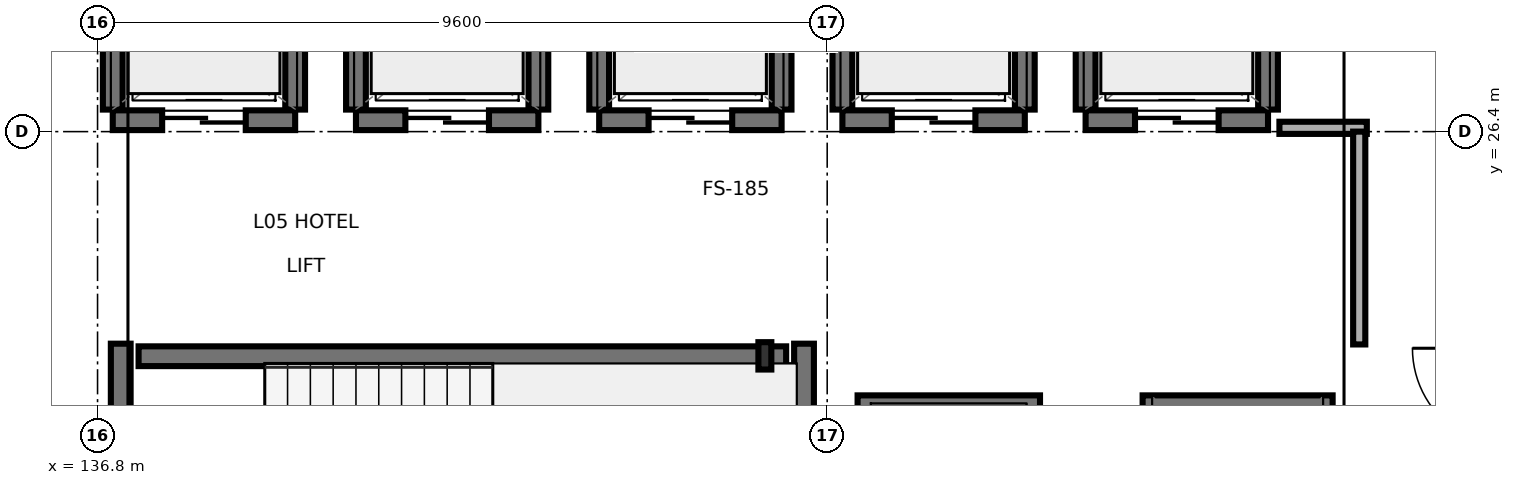
"""IFC4 building model, lengths in metres.
Left out: names, types, materials, properties, quantities, classifications, styles, units other than length and angle.
Written with IfcOpenShell. Run it as: python <this file> out.ifc"""

import sys

from ifc_helpers import new_model, si_unit, direction, frame, frame_2d, origin, origin_2d, place, context, subcontext, project, spatial, rectangle, i_section, extrude, element, fill, save


model = new_model("IFC4")
c1 = context("Model", 3, precision=1e-05, world=origin(), true_north=direction((0.0, 1.0)))
c2 = subcontext(c1, "Body", "Model", "MODEL_VIEW")
j1 = project(units=[si_unit("LENGTHUNIT", "METRE"), si_unit("PLANEANGLEUNIT", "RADIAN")], contexts=[c1])
p1 = place(None, origin())
s1 = spatial("IfcSite", under=j1, at=p1, CompositionType="ELEMENT")
p2 = place(p1, origin())
s2 = spatial("IfcBuilding", under=s1, at=p2, CompositionType="ELEMENT")
p3 = place(p2, frame((0.0, 0.0, 18.1)))
s3 = spatial("IfcBuildingStorey", under=s2, at=p3, CompositionType="ELEMENT", Elevation=18.1)
p4 = place(p3, frame((145.58, 23.45, 0.0), z_axis=(0.0, 0.0, 1.0), x_axis=(1.0, 0.0, 0.0)))
e1 = element("IfcColumn", 1, at=p4, inside=s3, PredefinedType="PILASTER", context=c2, shape_type="SweptSolid", body=[
    extrude(i_section(OverallWidth=0.17, OverallDepth=0.36, WebThickness=0.008, FlangeThickness=0.013, FilletRadius=0.018, at=origin_2d()), origin(), (0.0, 0.0, 1.0), 3.4),
])
p5 = place(p3, frame((137.105, 19.34, 0.0), z_axis=(0.0, 0.0, 1.0), x_axis=(0.0, 1.0, 0.0)))
e2 = element("IfcWall", 2, at=p5, inside=s3, PredefinedType="SHEAR", context=c2, shape_type="SweptSolid", body=[
    extrude(rectangle(XDim=4.27, YDim=0.26, at=frame_2d((2.135, 0.0))), origin(), (0.0, 0.0, 1.0), 3.21),
])
p6 = place(p5, frame((0.61, 0.0, 0.0)))
e3 = element("IfcOpeningElement", 3, at=p6, cuts=e2, PredefinedType="OPENING", context=c2, shape_type="SweptSolid", body=[
    extrude(rectangle(XDim=1.1, YDim=2.2, at=frame_2d((0.55, 1.1))), frame((0.0, 0.14, 0.0), z_axis=(0.0, -1.0, 0.0), x_axis=(1.0, 0.0, 0.0)), (0.0, 0.0, 1.0), 0.28),
])
p7 = place(p3, frame((146.095, 19.34, 0.0), z_axis=(0.0, 0.0, 1.0), x_axis=(0.0, 1.0, 0.0)))
e4 = element("IfcWall", 4, at=p7, inside=s3, PredefinedType="SHEAR", context=c2, shape_type="SweptSolid", body=[
    extrude(rectangle(XDim=4.27, YDim=0.26, at=frame_2d((2.135, 0.0))), origin(), (0.0, 0.0, 1.0), 3.21),
])
p8 = place(p3, frame((137.34, 23.445, 0.0), z_axis=(0.0, 0.0, 1.0), x_axis=(1.0, 0.0, 0.0)))
e5 = element("IfcWall", 5, at=p8, inside=s3, PredefinedType="SHEAR", context=c2, shape_type="SweptSolid", body=[
    extrude(rectangle(XDim=8.52, YDim=0.26, at=frame_2d((4.26, 0.0))), origin(), (0.0, 0.0, 1.0), 3.21),
])
p9 = place(p3, frame((137.0, 26.55, 0.0), z_axis=(0.0, 0.0, 1.0), x_axis=(1.0, 0.0, 0.0)))
e6 = element("IfcWall", 6, at=p9, inside=s3, PredefinedType="SHEAR", context=c2, shape_type="SweptSolid", body=[
    extrude(rectangle(XDim=2.4, YDim=0.26, at=frame_2d((1.2, 0.0))), origin(), (0.0, 0.0, 1.0), 2.745),
])
p10 = place(p9, frame((0.65, 0.0, 0.0)))
e7 = element("IfcOpeningElement", 7, at=p10, cuts=e6, PredefinedType="OPENING", context=c2, shape_type="SweptSolid", body=[
    extrude(rectangle(XDim=1.1, YDim=2.2, at=frame_2d((0.55, 1.1))), frame((0.0, 0.14, 0.0), z_axis=(0.0, -1.0, 0.0), x_axis=(1.0, 0.0, 0.0)), (0.0, 0.0, 1.0), 0.28),
])
for number, where, z_axis, x_axis in (
    (8, (137.0, 26.69, 0.0), (0.0, 0.0, 1.0), (0.0, 1.0, 0.0)),
    (9, (139.4, 26.69, 0.0), (0.0, 0.0, 1.0), (0.0, 1.0, 0.0)),
):
    element("IfcWall", number, at=place(p3, frame(where, z_axis=z_axis, x_axis=x_axis)), inside=s3, PredefinedType="SHEAR", context=c2, shape_type="SweptSolid", body=[
        extrude(rectangle(XDim=1.82, YDim=0.26, at=frame_2d((0.91, 0.0))), origin(), (0.0, 0.0, 1.0), 2.745),
    ])
p11 = place(p3, frame((140.2, 26.55, 0.0), z_axis=(0.0, 0.0, 1.0), x_axis=(1.0, 0.0, 0.0)))
e10 = element("IfcWall", 10, at=p11, inside=s3, PredefinedType="SHEAR", context=c2, shape_type="SweptSolid", body=[
    extrude(rectangle(XDim=2.4, YDim=0.26, at=frame_2d((1.2, 0.0))), origin(), (0.0, 0.0, 1.0), 3.21),
])
p12 = place(p11, frame((0.65, 0.0, 0.0)))
e11 = element("IfcOpeningElement", 11, at=p12, cuts=e10, PredefinedType="OPENING", context=c2, shape_type="SweptSolid", body=[
    extrude(rectangle(XDim=1.1, YDim=2.2, at=frame_2d((0.55, 1.1))), frame((0.0, 0.14, 0.0), z_axis=(0.0, -1.0, 0.0), x_axis=(1.0, 0.0, 0.0)), (0.0, 0.0, 1.0), 0.28),
])
for number, where, z_axis, x_axis in (
    (12, (140.2, 26.69, 0.0), (0.0, 0.0, 1.0), (0.0, 1.0, 0.0)),
    (13, (142.6, 26.69, 0.0), (0.0, 0.0, 1.0), (0.0, 1.0, 0.0)),
):
    element("IfcWall", number, at=place(p3, frame(where, z_axis=z_axis, x_axis=x_axis)), inside=s3, PredefinedType="SHEAR", context=c2, shape_type="SweptSolid", body=[
        extrude(rectangle(XDim=1.82, YDim=0.26, at=frame_2d((0.91, 0.0))), origin(), (0.0, 0.0, 1.0), 3.21),
    ])
p13 = place(p3, frame((143.4, 26.55, 0.0), z_axis=(0.0, 0.0, 1.0), x_axis=(1.0, 0.0, 0.0)))
e14 = element("IfcWall", 14, at=p13, inside=s3, PredefinedType="SHEAR", context=c2, shape_type="SweptSolid", body=[
    extrude(rectangle(XDim=2.4, YDim=0.26, at=frame_2d((1.2, 0.0))), origin(), (0.0, 0.0, 1.0), 3.21),
])
p14 = place(p13, frame((0.65, 0.0, 0.0)))
e15 = element("IfcOpeningElement", 15, at=p14, cuts=e14, PredefinedType="OPENING", context=c2, shape_type="SweptSolid", body=[
    extrude(rectangle(XDim=1.1, YDim=2.2, at=frame_2d((0.55, 1.1))), frame((0.0, 0.14, 0.0), z_axis=(0.0, -1.0, 0.0), x_axis=(1.0, 0.0, 0.0)), (0.0, 0.0, 1.0), 0.28),
])
for number, where, z_axis, x_axis in (
    (16, (143.4, 26.69, 0.0), (0.0, 0.0, 1.0), (0.0, 1.0, 0.0)),
    (17, (145.8, 26.69, 0.0), (0.0, 0.0, 1.0), (0.0, 1.0, 0.0)),
):
    element("IfcWall", number, at=place(p3, frame(where, z_axis=z_axis, x_axis=x_axis)), inside=s3, PredefinedType="SHEAR", context=c2, shape_type="SweptSolid", body=[
        extrude(rectangle(XDim=1.82, YDim=0.26, at=frame_2d((0.91, 0.0))), origin(), (0.0, 0.0, 1.0), 3.21),
    ])
p15 = place(p3, frame((146.6, 26.55, 0.0), z_axis=(0.0, 0.0, 1.0), x_axis=(1.0, 0.0, 0.0)))
e18 = element("IfcWall", 18, at=p15, inside=s3, PredefinedType="SHEAR", context=c2, shape_type="SweptSolid", body=[
    extrude(rectangle(XDim=2.4, YDim=0.26, at=frame_2d((1.2, 0.0))), origin(), (0.0, 0.0, 1.0), 3.21),
])
p16 = place(p15, frame((0.65, 0.0, 0.0)))
e19 = element("IfcOpeningElement", 19, at=p16, cuts=e18, PredefinedType="OPENING", context=c2, shape_type="SweptSolid", body=[
    extrude(rectangle(XDim=1.1, YDim=2.2, at=frame_2d((0.55, 1.1))), frame((0.0, 0.14, 0.0), z_axis=(0.0, -1.0, 0.0), x_axis=(1.0, 0.0, 0.0)), (0.0, 0.0, 1.0), 0.28),
])
for number, where, z_axis, x_axis in (
    (20, (146.6, 26.69, 0.0), (0.0, 0.0, 1.0), (0.0, 1.0, 0.0)),
    (21, (149.0, 26.69, 0.0), (0.0, 0.0, 1.0), (0.0, 1.0, 0.0)),
):
    element("IfcWall", number, at=place(p3, frame(where, z_axis=z_axis, x_axis=x_axis)), inside=s3, PredefinedType="SHEAR", context=c2, shape_type="SweptSolid", body=[
        extrude(rectangle(XDim=1.82, YDim=0.26, at=frame_2d((0.91, 0.0))), origin(), (0.0, 0.0, 1.0), 3.21),
    ])
p17 = place(p3, frame((149.8, 26.55, 0.0), z_axis=(0.0, 0.0, 1.0), x_axis=(1.0, 0.0, 0.0)))
e22 = element("IfcWall", 22, at=p17, inside=s3, PredefinedType="SHEAR", context=c2, shape_type="SweptSolid", body=[
    extrude(rectangle(XDim=2.4, YDim=0.26, at=frame_2d((1.2, 0.0))), origin(), (0.0, 0.0, 1.0), 3.21),
])
p18 = place(p17, frame((0.65, 0.0, 0.0)))
e23 = element("IfcOpeningElement", 23, at=p18, cuts=e22, PredefinedType="OPENING", context=c2, shape_type="SweptSolid", body=[
    extrude(rectangle(XDim=1.1, YDim=2.2, at=frame_2d((0.55, 1.1))), frame((0.0, 0.14, 0.0), z_axis=(0.0, -1.0, 0.0), x_axis=(1.0, 0.0, 0.0)), (0.0, 0.0, 1.0), 0.28),
])
for number, where, z_axis, x_axis in (
    (24, (149.8, 26.69, 0.0), (0.0, 0.0, 1.0), (0.0, 1.0, 0.0)),
    (25, (152.2, 26.69, 0.0), (0.0, 0.0, 1.0), (0.0, 1.0, 0.0)),
):
    element("IfcWall", number, at=place(p3, frame(where, z_axis=z_axis, x_axis=x_axis)), inside=s3, PredefinedType="SHEAR", context=c2, shape_type="SweptSolid", body=[
        extrude(rectangle(XDim=1.82, YDim=0.26, at=frame_2d((0.91, 0.0))), origin(), (0.0, 0.0, 1.0), 3.21),
    ])
p19 = place(p3, frame((146.8, 22.8, 0.0), z_axis=(0.0, 0.0, 1.0), x_axis=(1.0, 0.0, 0.0)))
e26 = element("IfcWall", 26, at=p19, inside=s3, PredefinedType="SHEAR", context=c2, shape_type="SweptSolid", body=[
    extrude(rectangle(XDim=2.4, YDim=0.26, at=frame_2d((1.2, 0.0))), origin(), (0.0, 0.0, 1.0), 3.21),
])
p20 = place(p3, frame((150.55, 22.8, 0.0), z_axis=(0.0, 0.0, 1.0), x_axis=(1.0, 0.0, 0.0)))
e27 = element("IfcWall", 27, at=p20, inside=s3, PredefinedType="SHEAR", context=c2, shape_type="SweptSolid", body=[
    extrude(rectangle(XDim=2.5, YDim=0.26, at=frame_2d((1.25, 0.0))), origin(), (0.0, 0.0, 1.0), 3.21),
])
p21 = place(p3, frame((152.35, 26.45, 0.0), z_axis=(0.0, 0.0, 1.0), x_axis=(1.0, 0.0, 0.0)))
e28 = element("IfcWall", 28, at=p21, inside=s3, PredefinedType="PARTITIONING", context=c2, shape_type="SweptSolid", body=[
    extrude(rectangle(XDim=1.15, YDim=0.16, at=frame_2d((0.575, 0.0))), origin(), (0.0, 0.0, 1.0), 3.21),
])
p22 = place(p3, frame((153.4, 23.6, 0.0), z_axis=(0.0, 0.0, 1.0), x_axis=(0.0, 1.0, 0.0)))
e29 = element("IfcWall", 29, at=p22, inside=s3, PredefinedType="PARTITIONING", context=c2, shape_type="SweptSolid", body=[
    extrude(rectangle(XDim=2.8, YDim=0.16, at=frame_2d((1.4, 0.0))), origin(), (0.0, 0.0, 1.0), 3.21),
])
p23 = place(p10, origin())
e30 = element("IfcDoor", 30, at=p23, inside=s3, OperationType="SLIDING_TO_LEFT", PredefinedType="DOOR", context=c2, shape_type="SweptSolid", body=[
    extrude(rectangle(XDim=1.1, YDim=2.2, at=frame_2d((0.55, 1.1))), frame((0.0, 0.025, 0.0), z_axis=(0.0, -1.0, 0.0), x_axis=(1.0, 0.0, 0.0)), (0.0, 0.0, 1.0), 0.05),
])
fill(e7, e30)
p24 = place(p12, origin())
e31 = element("IfcDoor", 31, at=p24, inside=s3, OperationType="SLIDING_TO_RIGHT", PredefinedType="DOOR", context=c2, shape_type="SweptSolid", body=[
    extrude(rectangle(XDim=1.1, YDim=2.2, at=frame_2d((0.55, 1.1))), frame((0.0, 0.025, 0.0), z_axis=(0.0, -1.0, 0.0), x_axis=(1.0, 0.0, 0.0)), (0.0, 0.0, 1.0), 0.05),
])
fill(e11, e31)
p25 = place(p14, origin())
e32 = element("IfcDoor", 32, at=p25, inside=s3, OperationType="SLIDING_TO_LEFT", PredefinedType="DOOR", context=c2, shape_type="SweptSolid", body=[
    extrude(rectangle(XDim=1.1, YDim=2.2, at=frame_2d((0.55, 1.1))), frame((0.0, 0.025, 0.0), z_axis=(0.0, -1.0, 0.0), x_axis=(1.0, 0.0, 0.0)), (0.0, 0.0, 1.0), 0.05),
])
fill(e15, e32)
p26 = place(p16, origin())
e33 = element("IfcDoor", 33, at=p26, inside=s3, OperationType="SLIDING_TO_RIGHT", PredefinedType="DOOR", context=c2, shape_type="SweptSolid", body=[
    extrude(rectangle(XDim=1.1, YDim=2.2, at=frame_2d((0.55, 1.1))), frame((0.0, 0.025, 0.0), z_axis=(0.0, -1.0, 0.0), x_axis=(1.0, 0.0, 0.0)), (0.0, 0.0, 1.0), 0.05),
])
fill(e19, e33)
p27 = place(p18, origin())
e34 = element("IfcDoor", 34, at=p27, inside=s3, OperationType="SLIDING_TO_LEFT", PredefinedType="DOOR", context=c2, shape_type="SweptSolid", body=[
    extrude(rectangle(XDim=1.1, YDim=2.2, at=frame_2d((0.55, 1.1))), frame((0.0, 0.025, 0.0), z_axis=(0.0, -1.0, 0.0), x_axis=(1.0, 0.0, 0.0)), (0.0, 0.0, 1.0), 0.05),
])
fill(e23, e34)
save(model, sys.argv[1])
